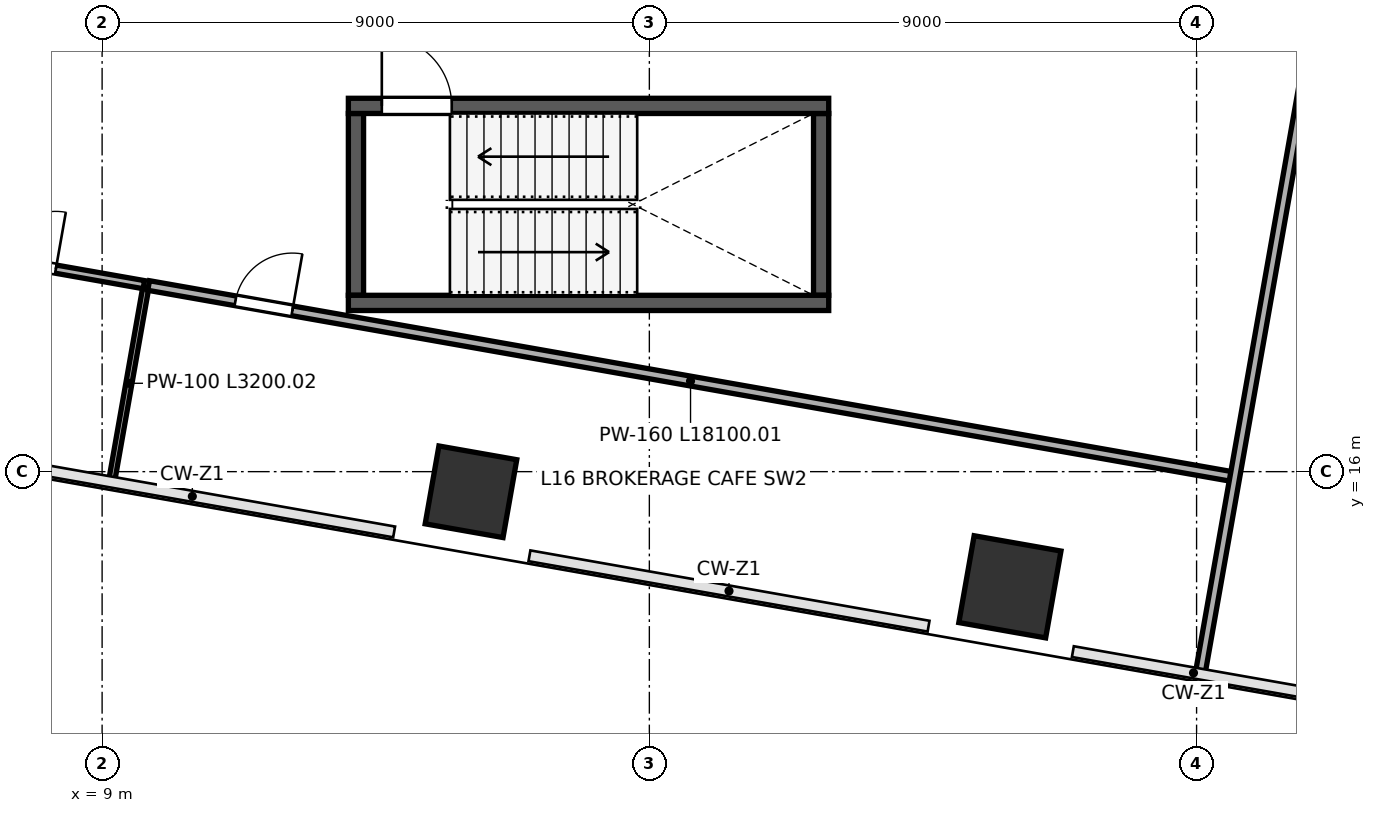
"""IFC4 building model, lengths in metres.
Left out: names, types, materials, properties, quantities, classifications, styles, units other than length and angle.
Written with IfcOpenShell. Run it as: python <this file> out.ifc"""

import sys

from ifc_helpers import new_model, si_unit, direction, frame, frame_2d, origin, origin_2d, place, context, subcontext, project, spatial, rectangle, extrude, source, transform, mapped, element, fill, save


model = new_model("IFC4")
c1 = context("Model", 3, precision=1e-05, world=origin(), true_north=direction((0.0, 1.0)))
c2 = subcontext(c1, "Body", "Model", "MODEL_VIEW")
j1 = project(units=[si_unit("LENGTHUNIT", "METRE"), si_unit("PLANEANGLEUNIT", "RADIAN")], contexts=[c1])
p1 = place(None, origin())
s1 = spatial("IfcSite", under=j1, at=p1, CompositionType="ELEMENT")
p2 = place(p1, origin())
s2 = spatial("IfcBuilding", under=s1, at=p2, CompositionType="ELEMENT")
p3 = place(p2, frame((0.0, 0.0, 74.8)))
s3 = spatial("IfcBuildingStorey", under=s2, at=p3, CompositionType="ELEMENT", Elevation=74.8)
m1 = source(origin(), c2, "Body", "SweptSolid", [
    extrude(rectangle(XDim=1.3, YDim=1.3, at=origin_2d()), origin(), (0.0, 0.0, 1.0), 4.198),
])
p4 = place(p3, frame((15.066, 15.669, 0.001), z_axis=(0.0, 0.0, 1.0), x_axis=(-0.984807753012, 0.173648177667, 0.0)))
e1 = element("IfcColumn", 1, at=p4, inside=s3, PredefinedType="COLUMN", context=c2, shape_type="MappedRepresentation", body=[
    mapped(m1, transform((0.0, 0.0, 0.0), scale=1.0)),
])
m2 = source(origin(), c2, "Body", "SweptSolid", [
    extrude(rectangle(XDim=1.45, YDim=1.45, at=origin_2d()), origin(), (0.0, 0.0, 1.0), 4.198),
])
p5 = place(p3, frame((23.93, 14.106, 0.001), z_axis=(0.0, 0.0, 1.0), x_axis=(-0.984807753012, 0.173648177667, 0.0)))
e2 = element("IfcColumn", 2, at=p5, inside=s3, PredefinedType="COLUMN", context=c2, shape_type="MappedRepresentation", body=[
    mapped(m2, transform((0.0, 0.0, 0.0), scale=1.0)),
])
for number, where, z_axis, x_axis in (
    (3, (13.175, 18.9, 0.0), (0.0, 0.0, 1.0), (0.0, 1.0, 0.0)),
    (4, (20.825, 18.9, 0.0), (0.0, 0.0, 1.0), (0.0, 1.0, 0.0)),
):
    element("IfcWall", number, at=place(p3, frame(where, z_axis=z_axis, x_axis=x_axis)), inside=s3, PredefinedType="SHEAR", context=c2, shape_type="SweptSolid", body=[
        extrude(rectangle(XDim=2.99, YDim=0.25, at=frame_2d((1.495, 0.0))), origin(), (0.0, 0.0, 1.0), 3.96),
    ])
p6 = place(p3, frame((13.05, 18.775, 0.0), z_axis=(0.0, 0.0, 1.0), x_axis=(1.0, 0.0, 0.0)))
e5 = element("IfcWall", 5, at=p6, inside=s3, PredefinedType="SHEAR", context=c2, shape_type="SweptSolid", body=[
    extrude(rectangle(XDim=7.9, YDim=0.25, at=frame_2d((3.95, 0.0))), origin(), (0.0, 0.0, 1.0), 3.96),
])
p7 = place(p3, frame((13.05, 22.015, 0.0), z_axis=(0.0, 0.0, 1.0), x_axis=(1.0, 0.0, 0.0)))
e6 = element("IfcWall", 6, at=p7, inside=s3, PredefinedType="SHEAR", context=c2, shape_type="SweptSolid", body=[
    extrude(rectangle(XDim=7.9, YDim=0.25, at=frame_2d((3.95, 0.0))), origin(), (0.0, 0.0, 1.0), 3.96),
])
p8 = place(p7, frame((0.55, 0.0, 0.0)))
e7 = element("IfcOpeningElement", 7, at=p8, cuts=e6, PredefinedType="OPENING", context=c2, shape_type="SweptSolid", body=[
    extrude(rectangle(XDim=1.15, YDim=2.2, at=frame_2d((0.575, 1.1))), frame((0.0, 0.135, 0.0), z_axis=(0.0, -1.0, 0.0), x_axis=(1.0, 0.0, 0.0)), (0.0, 0.0, 1.0), 0.27),
])
p9 = place(p3, frame((9.163, 15.877, 0.0), z_axis=(0.0, 0.0, 1.0), x_axis=(0.173646056486, 0.984808127031, 0.0)))
e8 = element("IfcWall", 8, at=p9, inside=s3, PredefinedType="PARTITIONING", context=c2, shape_type="SweptSolid", body=[
    extrude(rectangle(XDim=3.2, YDim=0.1, at=frame_2d((1.6, 0.0))), origin(), (0.0, 0.0, 1.0), 3.095),
])
p10 = place(p3, frame((2.379, 20.364, 0.0), z_axis=(0.0, 0.0, 1.0), x_axis=(0.984810378022, -0.173633289837, 0.0)))
e9 = element("IfcWall", 9, at=p10, inside=s3, PredefinedType="PARTITIONING", context=c2, shape_type="SweptSolid", body=[
    extrude(rectangle(XDim=7.42, YDim=0.135, at=frame_2d((3.71, 0.0))), origin(), (0.0, 0.0, 1.0), 3.96),
])
p11 = place(p10, frame((2.9, 0.0, 0.0)))
e10 = element("IfcOpeningElement", 10, at=p11, cuts=e9, PredefinedType="OPENING", context=c2, shape_type="SweptSolid", body=[
    extrude(rectangle(XDim=0.9, YDim=2.15, at=frame_2d((0.45, 1.075))), frame((0.0, 0.078, 0.0), z_axis=(0.0, -1.0, 0.0), x_axis=(1.0, 0.0, 0.0)), (0.0, 0.0, 1.0), 0.155),
])
p12 = place(p10, frame((5.0, 0.0, 0.0)))
e11 = element("IfcOpeningElement", 11, at=p12, cuts=e9, PredefinedType="OPENING", context=c2, shape_type="SweptSolid", body=[
    extrude(rectangle(XDim=0.95, YDim=2.15, at=frame_2d((0.475, 1.075))), frame((0.0, 0.078, 0.0), z_axis=(0.0, -1.0, 0.0), x_axis=(1.0, 0.0, 0.0)), (0.0, 0.0, 1.0), 0.155),
])
p13 = place(p3, frame((9.765, 19.061, 0.0), z_axis=(0.0, 0.0, 1.0), x_axis=(0.984807312871, -0.173650673815, 0.0)))
e12 = element("IfcWall", 12, at=p13, inside=s3, PredefinedType="PARTITIONING", context=c2, shape_type="SweptSolid", body=[
    extrude(rectangle(XDim=18.1, YDim=0.16, at=frame_2d((9.05, 0.0))), origin(), (0.0, 0.0, 1.0), 3.96),
])
p14 = place(p13, frame((1.45, 0.0, 0.0)))
e13 = element("IfcOpeningElement", 13, at=p14, cuts=e12, PredefinedType="OPENING", context=c2, shape_type="SweptSolid", body=[
    extrude(rectangle(XDim=0.95, YDim=2.15, at=frame_2d((0.475, 1.075))), frame((0.0, 0.09, 0.0), z_axis=(0.0, -1.0, 0.0), x_axis=(1.0, 0.0, 0.0)), (0.0, 0.0, 1.0), 0.18),
])
p15 = place(p3, frame((27.067, 12.72, 0.0), z_axis=(0.0, 0.0, 1.0), x_axis=(0.173654514703, 0.984806635601, 0.0)))
e14 = element("IfcWall", 14, at=p15, inside=s3, PredefinedType="PARTITIONING", context=c2, shape_type="SweptSolid", body=[
    extrude(rectangle(XDim=21.08, YDim=0.16, at=frame_2d((10.54, 0.0))), origin(), (0.0, 0.0, 1.0), 3.96),
])
m3 = source(origin(), c2, "Body", "SweptSolid", [
    extrude(rectangle(XDim=1.15, YDim=2.2, at=frame_2d((0.575, 1.1))), frame((0.0, 0.025, 0.0), z_axis=(0.0, -1.0, 0.0), x_axis=(1.0, 0.0, 0.0)), (0.0, 0.0, 1.0), 0.05),
])
p16 = place(p8, origin())
e15 = element("IfcDoor", 15, at=p16, inside=s3, OperationType="SINGLE_SWING_LEFT", PredefinedType="DOOR", context=c2, shape_type="MappedRepresentation", body=[
    mapped(m3, transform((0.0, 0.0, 0.0), scale=1.0)),
])
fill(e7, e15)
m4 = source(origin(), c2, "Body", "SweptSolid", [
    extrude(rectangle(XDim=0.95, YDim=2.15, at=frame_2d((0.475, 1.075))), frame((0.0, 0.025, 0.0), z_axis=(0.0, -1.0, 0.0), x_axis=(1.0, 0.0, 0.0)), (0.0, 0.0, 1.0), 0.05),
])
p17 = place(p12, origin())
e16 = element("IfcDoor", 16, at=p17, inside=s3, OperationType="SINGLE_SWING_RIGHT", PredefinedType="DOOR", context=c2, shape_type="MappedRepresentation", body=[
    mapped(m4, transform((0.0, 0.0, 0.0), scale=1.0)),
])
fill(e11, e16)
m5 = source(origin(), c2, "Body", "SweptSolid", [
    extrude(rectangle(XDim=0.95, YDim=2.15, at=frame_2d((0.475, 1.075))), frame((0.0, 0.025, 0.0), z_axis=(0.0, -1.0, 0.0), x_axis=(1.0, 0.0, 0.0)), (0.0, 0.0, 1.0), 0.05),
])
p18 = place(p14, origin())
e17 = element("IfcDoor", 17, at=p18, inside=s3, OperationType="SINGLE_SWING_RIGHT", PredefinedType="DOOR", context=c2, shape_type="MappedRepresentation", body=[
    mapped(m5, transform((0.0, 0.0, 0.0), scale=1.0)),
])
fill(e13, e17)
save(model, sys.argv[1])
